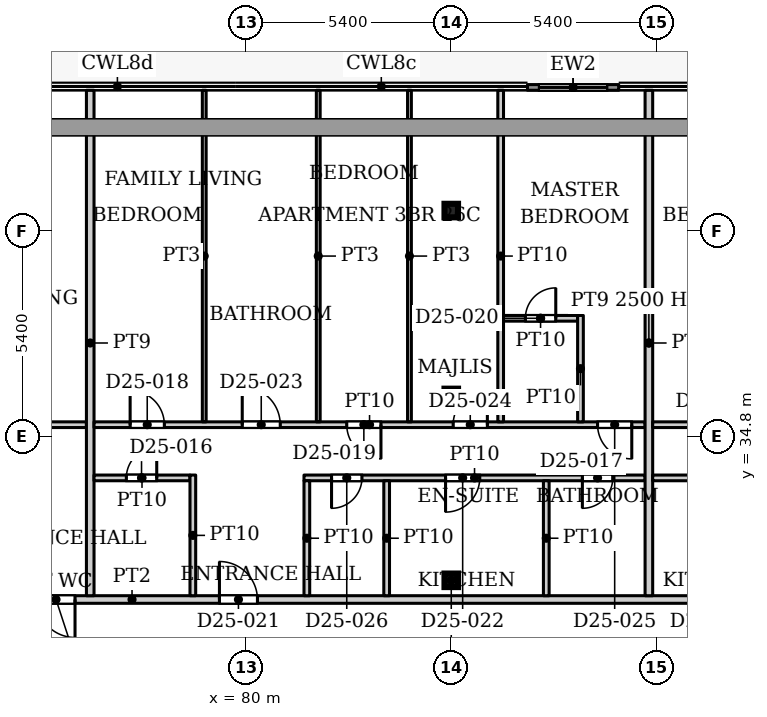
"""IFC4 building model, lengths in metres.
Left out: names, types, materials, properties, quantities, classifications, styles, units other than length and angle.
Written with IfcOpenShell. Run it as: python <this file> out.ifc"""

import sys

from ifc_helpers import new_model, si_unit, direction, frame, frame_2d, origin, origin_2d, place, context, subcontext, project, spatial, rectangle, hollow_rectangle, extrude, source, transform, mapped, element, fill, save


model = new_model("IFC4")
c1 = context("Model", 3, precision=1e-05, world=origin(), true_north=direction((0.0, 1.0)))
c2 = subcontext(c1, "Body", "Model", "MODEL_VIEW")
j1 = project(units=[si_unit("LENGTHUNIT", "METRE"), si_unit("PLANEANGLEUNIT", "RADIAN")], contexts=[c1])
p1 = place(None, origin())
s1 = spatial("IfcSite", under=j1, at=p1, CompositionType="ELEMENT")
p2 = place(p1, origin())
s2 = spatial("IfcBuilding", under=s1, at=p2, CompositionType="ELEMENT")
p3 = place(p2, frame((0.0, 0.0, 113.6)))
s3 = spatial("IfcBuildingStorey", under=s2, at=p3, CompositionType="ELEMENT", Elevation=113.6)
for number, where, z_axis, x_axis in (
    (1, (85.4, 31.005, 0.0), (0.0, 0.0, 1.0), (1.0, 0.0, 0.0)),
    (2, (85.4, 35.87, 0.0), (0.0, 0.0, 1.0), (1.0, 0.0, 0.0)),
    (3, (85.4, 40.735, 0.0), (0.0, 0.0, 1.0), (1.0, 0.0, 0.0)),
):
    element("IfcColumn", number, at=place(p3, frame(where, z_axis=z_axis, x_axis=x_axis)), inside=s3, PredefinedType="COLUMN", context=c2, shape_type="SweptSolid", body=[
        extrude(hollow_rectangle(XDim=0.356, YDim=0.356, WallThickness=0.016, InnerFilletRadius=0.016, OuterFilletRadius=0.032, at=origin_2d()), origin(), (0.0, 0.0, 1.0), 3.9),
    ])
p4 = place(p3, frame((87.406, 43.975, 0.0), z_axis=(0.0, 0.0, 1.0), x_axis=(1.0, 0.0, 0.0)))
e4 = element("IfcWall", 4, at=p4, inside=s3, PredefinedType="SOLIDWALL", context=c2, shape_type="SweptSolid", body=[
    extrude(rectangle(XDim=2.4, YDim=0.15, at=frame_2d((1.2, 0.0))), origin(), (0.0, 0.0, 1.0), 3.75),
])
p5 = place(p4, frame((0.3, 0.0, 0.0)))
e5 = element("IfcOpeningElement", 5, at=p5, cuts=e4, PredefinedType="OPENING", context=c2, shape_type="SweptSolid", body=[
    extrude(rectangle(XDim=1.8, YDim=2.4, at=frame_2d((0.9, 1.2))), frame((0.0, 0.085, 0.0), z_axis=(0.0, -1.0, 0.0), x_axis=(1.0, 0.0, 0.0)), (0.0, 0.0, 1.0), 0.17),
])
p6 = place(p3, frame((55.9, 30.5, 0.0), z_axis=(0.0, 0.0, 1.0), x_axis=(1.0, 0.0, 0.0)))
e6 = element("IfcWall", 6, at=p6, inside=s3, PredefinedType="PARTITIONING", context=c2, shape_type="SweptSolid", body=[
    extrude(rectangle(XDim=42.2, YDim=0.2, at=frame_2d((21.1, 0.0))), origin(), (0.0, 0.0, 1.0), 3.6),
])
p7 = place(p6, frame((9.75, 0.0, 0.0)))
e7 = element("IfcOpeningElement", 7, at=p7, cuts=e6, PredefinedType="OPENING", context=c2, shape_type="SweptSolid", body=[
    extrude(rectangle(XDim=1.0, YDim=2.1, at=frame_2d((0.5, 1.05))), frame((0.0, 0.11, 0.0), z_axis=(0.0, -1.0, 0.0), x_axis=(1.0, 0.0, 0.0)), (0.0, 0.0, 1.0), 0.22),
])
p8 = place(p6, frame((18.6, 0.0, 0.0)))
e8 = element("IfcOpeningElement", 8, at=p8, cuts=e6, PredefinedType="OPENING", context=c2, shape_type="SweptSolid", body=[
    extrude(rectangle(XDim=1.0, YDim=2.1, at=frame_2d((0.5, 1.05))), frame((0.0, 0.11, 0.0), z_axis=(0.0, -1.0, 0.0), x_axis=(1.0, 0.0, 0.0)), (0.0, 0.0, 1.0), 0.22),
])
p9 = place(p6, frame((23.4, 0.0, 0.0)))
e9 = element("IfcOpeningElement", 9, at=p9, cuts=e6, PredefinedType="OPENING", context=c2, shape_type="SweptSolid", body=[
    extrude(rectangle(XDim=1.0, YDim=2.1, at=frame_2d((0.5, 1.05))), frame((0.0, 0.11, 0.0), z_axis=(0.0, -1.0, 0.0), x_axis=(1.0, 0.0, 0.0)), (0.0, 0.0, 1.0), 0.22),
])
p10 = place(p6, frame((40.2, 0.0, 0.0)))
e10 = element("IfcOpeningElement", 10, at=p10, cuts=e6, PredefinedType="OPENING", context=c2, shape_type="SweptSolid", body=[
    extrude(rectangle(XDim=1.0, YDim=2.1, at=frame_2d((0.5, 1.05))), frame((0.0, 0.11, 0.0), z_axis=(0.0, -1.0, 0.0), x_axis=(1.0, 0.0, 0.0)), (0.0, 0.0, 1.0), 0.22),
])
p11 = place(p3, frame((67.3, 35.1, 0.0), z_axis=(0.0, 0.0, 1.0), x_axis=(1.0, 0.0, 0.0)))
e11 = element("IfcWall", 11, at=p11, inside=s3, PredefinedType="PARTITIONING", context=c2, shape_type="SweptSolid", body=[
    extrude(rectangle(XDim=8.5, YDim=0.15, at=frame_2d((4.25, 0.0))), origin(), (0.0, 0.0, 1.0), 3.6),
])
p12 = place(p11, frame((1.0, 0.0, 0.0)))
e12 = element("IfcOpeningElement", 12, at=p12, cuts=e11, PredefinedType="OPENING", context=c2, shape_type="SweptSolid", body=[
    extrude(rectangle(XDim=0.9, YDim=2.1, at=frame_2d((0.45, 1.05))), frame((0.0, 0.085, 0.0), z_axis=(0.0, -1.0, 0.0), x_axis=(1.0, 0.0, 0.0)), (0.0, 0.0, 1.0), 0.17),
])
p13 = place(p11, frame((5.7, 0.0, 0.0)))
e13 = element("IfcOpeningElement", 13, at=p13, cuts=e11, PredefinedType="OPENING", context=c2, shape_type="SweptSolid", body=[
    extrude(rectangle(XDim=1.0, YDim=2.1, at=frame_2d((0.5, 1.05))), frame((0.0, 0.085, 0.0), z_axis=(0.0, -1.0, 0.0), x_axis=(1.0, 0.0, 0.0)), (0.0, 0.0, 1.0), 0.17),
])
p14 = place(p3, frame((75.9, 30.6, 0.0), z_axis=(0.0, 0.0, 1.0), x_axis=(0.0, 1.0, 0.0)))
e14 = element("IfcWall", 14, at=p14, inside=s3, PredefinedType="PARTITIONING", context=c2, shape_type="SweptSolid", body=[
    extrude(rectangle(XDim=13.3, YDim=0.2, at=frame_2d((6.65, 0.0))), origin(), (0.0, 0.0, 1.0), 3.6),
])
p15 = place(p3, frame((76.0, 33.7, 0.0), z_axis=(0.0, 0.0, 1.0), x_axis=(1.0, 0.0, 0.0)))
e15 = element("IfcWall", 15, at=p15, inside=s3, PredefinedType="PARTITIONING", context=c2, shape_type="SweptSolid", body=[
    extrude(rectangle(XDim=2.525, YDim=0.15, at=frame_2d((1.262, 0.0))), origin(), (0.0, 0.0, 1.0), 3.6),
])
p16 = place(p15, frame((0.85, 0.0, 0.0)))
e16 = element("IfcOpeningElement", 16, at=p16, cuts=e15, PredefinedType="OPENING", context=c2, shape_type="SweptSolid", body=[
    extrude(rectangle(XDim=0.8, YDim=2.1, at=frame_2d((0.4, 1.05))), frame((0.0, 0.085, 0.0), z_axis=(0.0, -1.0, 0.0), x_axis=(1.0, 0.0, 0.0)), (0.0, 0.0, 1.0), 0.17),
])
p17 = place(p3, frame((76.0, 35.1, 0.0), z_axis=(0.0, 0.0, 1.0), x_axis=(1.0, 0.0, 0.0)))
e17 = element("IfcWall", 17, at=p17, inside=s3, PredefinedType="PARTITIONING", context=c2, shape_type="SweptSolid", body=[
    extrude(rectangle(XDim=14.5, YDim=0.15, at=frame_2d((7.25, 0.0))), origin(), (0.0, 0.0, 1.0), 3.6),
])
p18 = place(p17, frame((0.95, 0.0, 0.0)))
e18 = element("IfcOpeningElement", 18, at=p18, cuts=e17, PredefinedType="OPENING", context=c2, shape_type="SweptSolid", body=[
    extrude(rectangle(XDim=0.9, YDim=2.1, at=frame_2d((0.45, 1.05))), frame((0.0, 0.085, 0.0), z_axis=(0.0, -1.0, 0.0), x_axis=(1.0, 0.0, 0.0)), (0.0, 0.0, 1.0), 0.17),
])
p19 = place(p17, frame((6.65, 0.0, 0.0)))
e19 = element("IfcOpeningElement", 19, at=p19, cuts=e17, PredefinedType="OPENING", context=c2, shape_type="SweptSolid", body=[
    extrude(rectangle(XDim=0.9, YDim=2.1, at=frame_2d((0.45, 1.05))), frame((0.0, 0.085, 0.0), z_axis=(0.0, -1.0, 0.0), x_axis=(1.0, 0.0, 0.0)), (0.0, 0.0, 1.0), 0.17),
])
p20 = place(p17, frame((3.9, 0.0, 0.0)))
e20 = element("IfcOpeningElement", 20, at=p20, cuts=e17, PredefinedType="OPENING", context=c2, shape_type="SweptSolid", body=[
    extrude(rectangle(XDim=1.0, YDim=2.1, at=frame_2d((0.5, 1.05))), frame((0.0, 0.085, 0.0), z_axis=(0.0, -1.0, 0.0), x_axis=(1.0, 0.0, 0.0)), (0.0, 0.0, 1.0), 0.17),
])
p21 = place(p17, frame((9.45, 0.0, 0.0)))
e21 = element("IfcOpeningElement", 21, at=p21, cuts=e17, PredefinedType="OPENING", context=c2, shape_type="SweptSolid", body=[
    extrude(rectangle(XDim=0.9, YDim=2.1, at=frame_2d((0.45, 1.05))), frame((0.0, 0.085, 0.0), z_axis=(0.0, -1.0, 0.0), x_axis=(1.0, 0.0, 0.0)), (0.0, 0.0, 1.0), 0.17),
])
p22 = place(p17, frame((13.25, 0.0, 0.0)))
e22 = element("IfcOpeningElement", 22, at=p22, cuts=e17, PredefinedType="OPENING", context=c2, shape_type="SweptSolid", body=[
    extrude(rectangle(XDim=0.9, YDim=2.1, at=frame_2d((0.45, 1.05))), frame((0.0, 0.085, 0.0), z_axis=(0.0, -1.0, 0.0), x_axis=(1.0, 0.0, 0.0)), (0.0, 0.0, 1.0), 0.17),
])
p23 = place(p3, frame((78.6, 30.6, 0.0), z_axis=(0.0, 0.0, 1.0), x_axis=(0.0, 1.0, 0.0)))
e23 = element("IfcWall", 23, at=p23, inside=s3, PredefinedType="PARTITIONING", context=c2, shape_type="SweptSolid", body=[
    extrude(rectangle(XDim=3.175, YDim=0.15, at=frame_2d((1.587, 0.0))), origin(), (0.0, 0.0, 1.0), 3.6),
])
p24 = place(p3, frame((78.9, 35.175, 0.0), z_axis=(0.0, 0.0, 1.0), x_axis=(0.0, 1.0, 0.0)))
e24 = element("IfcWall", 24, at=p24, inside=s3, PredefinedType="PARTITIONING", context=c2, shape_type="SweptSolid", body=[
    extrude(rectangle(XDim=8.725, YDim=0.1, at=frame_2d((4.362, 0.0))), origin(), (0.0, 0.0, 1.0), 3.6),
])
p25 = place(p3, frame((81.525, 33.7, 0.0), z_axis=(0.0, 0.0, 1.0), x_axis=(1.0, 0.0, 0.0)))
e25 = element("IfcWall", 25, at=p25, inside=s3, PredefinedType="PARTITIONING", context=c2, shape_type="SweptSolid", body=[
    extrude(rectangle(XDim=8.975, YDim=0.15, at=frame_2d((4.488, 0.0))), origin(), (0.0, 0.0, 1.0), 3.6),
])
p26 = place(p25, frame((7.325, 0.0, 0.0)))
e26 = element("IfcOpeningElement", 26, at=p26, cuts=e25, PredefinedType="OPENING", context=c2, shape_type="SweptSolid", body=[
    extrude(rectangle(XDim=0.8, YDim=2.1, at=frame_2d((0.4, 1.05))), frame((0.0, 0.085, 0.0), z_axis=(0.0, -1.0, 0.0), x_axis=(1.0, 0.0, 0.0)), (0.0, 0.0, 1.0), 0.17),
])
p27 = place(p25, frame((3.725, 0.0, 0.0)))
e27 = element("IfcOpeningElement", 27, at=p27, cuts=e25, PredefinedType="OPENING", context=c2, shape_type="SweptSolid", body=[
    extrude(rectangle(XDim=0.9, YDim=2.1, at=frame_2d((0.45, 1.05))), frame((0.0, 0.085, 0.0), z_axis=(0.0, -1.0, 0.0), x_axis=(1.0, 0.0, 0.0)), (0.0, 0.0, 1.0), 0.17),
])
p28 = place(p25, frame((0.725, 0.0, 0.0)))
e28 = element("IfcOpeningElement", 28, at=p28, cuts=e25, PredefinedType="OPENING", context=c2, shape_type="SweptSolid", body=[
    extrude(rectangle(XDim=0.8, YDim=2.1, at=frame_2d((0.4, 1.05))), frame((0.0, 0.085, 0.0), z_axis=(0.0, -1.0, 0.0), x_axis=(1.0, 0.0, 0.0)), (0.0, 0.0, 1.0), 0.17),
])
p29 = place(p3, frame((81.6, 30.6, 0.0), z_axis=(0.0, 0.0, 1.0), x_axis=(0.0, 1.0, 0.0)))
e29 = element("IfcWall", 29, at=p29, inside=s3, PredefinedType="PARTITIONING", context=c2, shape_type="SweptSolid", body=[
    extrude(rectangle(XDim=3.025, YDim=0.15, at=frame_2d((1.512, 0.0))), origin(), (0.0, 0.0, 1.0), 3.6),
])
p30 = place(p3, frame((81.9, 35.175, 0.0), z_axis=(0.0, 0.0, 1.0), x_axis=(0.0, 1.0, 0.0)))
e30 = element("IfcWall", 30, at=p30, inside=s3, PredefinedType="PARTITIONING", context=c2, shape_type="SweptSolid", body=[
    extrude(rectangle(XDim=8.725, YDim=0.1, at=frame_2d((4.362, 0.0))), origin(), (0.0, 0.0, 1.0), 3.6),
])
p31 = place(p3, frame((83.7, 30.6, 0.0), z_axis=(0.0, 0.0, 1.0), x_axis=(0.0, 1.0, 0.0)))
e31 = element("IfcWall", 31, at=p31, inside=s3, PredefinedType="PARTITIONING", context=c2, shape_type="SweptSolid", body=[
    extrude(rectangle(XDim=3.025, YDim=0.15, at=frame_2d((1.512, 0.0))), origin(), (0.0, 0.0, 1.0), 3.6),
])
p32 = place(p3, frame((84.3, 35.175, 0.0), z_axis=(0.0, 0.0, 1.0), x_axis=(0.0, 1.0, 0.0)))
e32 = element("IfcWall", 32, at=p32, inside=s3, PredefinedType="PARTITIONING", context=c2, shape_type="SweptSolid", body=[
    extrude(rectangle(XDim=8.725, YDim=0.1, at=frame_2d((4.362, 0.0))), origin(), (0.0, 0.0, 1.0), 3.6),
])
p33 = place(p3, frame((86.7, 35.175, 0.0), z_axis=(0.0, 0.0, 1.0), x_axis=(0.0, 1.0, 0.0)))
e33 = element("IfcWall", 33, at=p33, inside=s3, PredefinedType="PARTITIONING", context=c2, shape_type="SweptSolid", body=[
    extrude(rectangle(XDim=8.725, YDim=0.15, at=frame_2d((4.362, 0.0))), origin(), (0.0, 0.0, 1.0), 3.6),
])
p34 = place(p3, frame((86.775, 37.9, 0.0), z_axis=(0.0, 0.0, 1.0), x_axis=(1.0, 0.0, 0.0)))
e34 = element("IfcWall", 34, at=p34, inside=s3, PredefinedType="PARTITIONING", context=c2, shape_type="SweptSolid", body=[
    extrude(rectangle(XDim=1.95, YDim=0.15, at=frame_2d((0.975, 0.0))), origin(), (0.0, 0.0, 1.0), 3.6),
])
p35 = place(p34, frame((0.575, 0.0, 0.0)))
e35 = element("IfcOpeningElement", 35, at=p35, cuts=e34, PredefinedType="OPENING", context=c2, shape_type="SweptSolid", body=[
    extrude(rectangle(XDim=0.8, YDim=2.1, at=frame_2d((0.4, 1.05))), frame((0.0, 0.085, 0.0), z_axis=(0.0, -1.0, 0.0), x_axis=(1.0, 0.0, 0.0)), (0.0, 0.0, 1.0), 0.17),
])
p36 = place(p3, frame((87.9, 30.6, 0.0), z_axis=(0.0, 0.0, 1.0), x_axis=(0.0, 1.0, 0.0)))
e36 = element("IfcWall", 36, at=p36, inside=s3, PredefinedType="PARTITIONING", context=c2, shape_type="SweptSolid", body=[
    extrude(rectangle(XDim=3.025, YDim=0.15, at=frame_2d((1.512, 0.0))), origin(), (0.0, 0.0, 1.0), 3.6),
])
p37 = place(p3, frame((88.8, 35.175, 0.0), z_axis=(0.0, 0.0, 1.0), x_axis=(0.0, 1.0, 0.0)))
e37 = element("IfcWall", 37, at=p37, inside=s3, PredefinedType="PARTITIONING", context=c2, shape_type="SweptSolid", body=[
    extrude(rectangle(XDim=2.8, YDim=0.15, at=frame_2d((1.4, 0.0))), origin(), (0.0, 0.0, 1.0), 3.6),
])
p38 = place(p3, frame((90.6, 30.6, 0.0), z_axis=(0.0, 0.0, 1.0), x_axis=(0.0, 1.0, 0.0)))
e38 = element("IfcWall", 38, at=p38, inside=s3, PredefinedType="PARTITIONING", context=c2, shape_type="SweptSolid", body=[
    extrude(rectangle(XDim=13.3, YDim=0.2, at=frame_2d((6.65, 0.0))), origin(), (0.0, 0.0, 1.0), 2.5),
])
p39 = place(p3, frame((90.7, 33.7, 0.0), z_axis=(0.0, 0.0, 1.0), x_axis=(1.0, 0.0, 0.0)))
e39 = element("IfcWall", 39, at=p39, inside=s3, PredefinedType="PARTITIONING", context=c2, shape_type="SweptSolid", body=[
    extrude(rectangle(XDim=5.075, YDim=0.15, at=frame_2d((2.538, 0.0))), origin(), (0.0, 0.0, 1.0), 3.6),
])
p40 = place(p39, frame((1.1, 0.0, 0.0)))
e40 = element("IfcOpeningElement", 40, at=p40, cuts=e39, PredefinedType="OPENING", context=c2, shape_type="SweptSolid", body=[
    extrude(rectangle(XDim=0.9, YDim=2.1, at=frame_2d((0.45, 1.05))), frame((0.0, 0.085, 0.0), z_axis=(0.0, -1.0, 0.0), x_axis=(1.0, 0.0, 0.0)), (0.0, 0.0, 1.0), 0.17),
])
p41 = place(p39, frame((3.7, 0.0, 0.0)))
e41 = element("IfcOpeningElement", 41, at=p41, cuts=e39, PredefinedType="OPENING", context=c2, shape_type="SweptSolid", body=[
    extrude(rectangle(XDim=0.8, YDim=2.1, at=frame_2d((0.4, 1.05))), frame((0.0, 0.085, 0.0), z_axis=(0.0, -1.0, 0.0), x_axis=(1.0, 0.0, 0.0)), (0.0, 0.0, 1.0), 0.17),
])
p42 = place(p3, frame((90.7, 35.1, 0.0), z_axis=(0.0, 0.0, 1.0), x_axis=(1.0, 0.0, 0.0)))
e42 = element("IfcWall", 42, at=p42, inside=s3, PredefinedType="PARTITIONING", context=c2, shape_type="SweptSolid", body=[
    extrude(rectangle(XDim=9.2, YDim=0.15, at=frame_2d((4.6, 0.0))), origin(), (0.0, 0.0, 1.0), 3.6),
])
p43 = place(p42, frame((1.25, 0.0, 0.0)))
e43 = element("IfcOpeningElement", 43, at=p43, cuts=e42, PredefinedType="OPENING", context=c2, shape_type="SweptSolid", body=[
    extrude(rectangle(XDim=0.9, YDim=2.1, at=frame_2d((0.45, 1.05))), frame((0.0, 0.085, 0.0), z_axis=(0.0, -1.0, 0.0), x_axis=(1.0, 0.0, 0.0)), (0.0, 0.0, 1.0), 0.17),
])
p44 = place(p42, frame((5.85, 0.0, 0.0)))
e44 = element("IfcOpeningElement", 44, at=p44, cuts=e42, PredefinedType="OPENING", context=c2, shape_type="SweptSolid", body=[
    extrude(rectangle(XDim=1.0, YDim=2.1, at=frame_2d((0.5, 1.05))), frame((0.0, 0.085, 0.0), z_axis=(0.0, -1.0, 0.0), x_axis=(1.0, 0.0, 0.0)), (0.0, 0.0, 1.0), 0.17),
])
m1 = source(origin(), c2, "Body", "SweptSolid", [
    extrude(rectangle(XDim=1.8, YDim=2.4, at=frame_2d((0.9, 1.2))), frame((0.0, 0.025, 0.0), z_axis=(0.0, -1.0, 0.0), x_axis=(1.0, 0.0, 0.0)), (0.0, 0.0, 1.0), 0.05),
])
p45 = place(p5, origin())
e45 = element("IfcDoor", 45, at=p45, inside=s3, OperationType="SLIDING_TO_LEFT", PredefinedType="DOOR", context=c2, shape_type="MappedRepresentation", body=[
    mapped(m1, transform((0.0, 0.0, 0.0), x_axis=(1.0, 0.0, 0.0), y_axis=(0.0, 1.0, 0.0), z_axis=(0.0, 0.0, 1.0), scale=1.0)),
])
fill(e5, e45)
m2 = source(origin(), c2, "Body", "SweptSolid", [
    extrude(rectangle(XDim=1.0, YDim=2.1, at=frame_2d((0.5, 1.05))), frame((0.0, 0.025, 0.0), z_axis=(0.0, -1.0, 0.0), x_axis=(1.0, 0.0, 0.0)), (0.0, 0.0, 1.0), 0.05),
])
p46 = place(p8, origin())
e46 = element("IfcDoor", 46, at=p46, inside=s3, OperationType="SINGLE_SWING_RIGHT", PredefinedType="DOOR", context=c2, shape_type="MappedRepresentation", body=[
    mapped(m2, transform((0.0, 0.0, 0.0), x_axis=(1.0, 0.0, 0.0), y_axis=(0.0, 1.0, 0.0), z_axis=(0.0, 0.0, 1.0), scale=1.0)),
])
fill(e8, e46)
m3 = source(origin(), c2, "Body", "SweptSolid", [
    extrude(rectangle(XDim=0.8, YDim=2.1, at=frame_2d((0.4, 1.05))), frame((0.0, 0.025, 0.0), z_axis=(0.0, -1.0, 0.0), x_axis=(1.0, 0.0, 0.0)), (0.0, 0.0, 1.0), 0.05),
])
p47 = place(p16, origin())
e47 = element("IfcDoor", 47, at=p47, inside=s3, OperationType="SINGLE_SWING_LEFT", PredefinedType="DOOR", context=c2, shape_type="MappedRepresentation", body=[
    mapped(m3, transform((0.0, 0.0, 0.0), x_axis=(1.0, 0.0, 0.0), y_axis=(0.0, 1.0, 0.0), z_axis=(0.0, 0.0, 1.0), scale=1.0)),
])
fill(e16, e47)
p48 = place(p26, origin())
e48 = element("IfcDoor", 48, at=p48, inside=s3, OperationType="SINGLE_SWING_RIGHT", PredefinedType="DOOR", context=c2, shape_type="MappedRepresentation", body=[
    mapped(m3, transform((0.0, 0.0, 0.0), x_axis=(1.0, 0.0, 0.0), y_axis=(0.0, 1.0, 0.0), z_axis=(0.0, 0.0, 1.0), scale=1.0)),
])
fill(e26, e48)
m4 = source(origin(), c2, "Body", "SweptSolid", [
    extrude(rectangle(XDim=0.9, YDim=2.1, at=frame_2d((0.45, 1.05))), frame((0.0, 0.025, 0.0), z_axis=(0.0, -1.0, 0.0), x_axis=(1.0, 0.0, 0.0)), (0.0, 0.0, 1.0), 0.05),
])
p49 = place(p18, origin())
e49 = element("IfcDoor", 49, at=p49, inside=s3, OperationType="SINGLE_SWING_LEFT", PredefinedType="DOOR", context=c2, shape_type="MappedRepresentation", body=[
    mapped(m4, transform((0.0, 0.0, 0.0), x_axis=(1.0, 0.0, 0.0), y_axis=(0.0, 1.0, 0.0), z_axis=(0.0, 0.0, 1.0), scale=1.0)),
])
fill(e18, e49)
p50 = place(p19, origin())
e50 = element("IfcDoor", 50, at=p50, inside=s3, OperationType="SINGLE_SWING_RIGHT", PredefinedType="DOOR", context=c2, shape_type="MappedRepresentation", body=[
    mapped(m4, transform((0.0, 0.0, 0.0), x_axis=(1.0, 0.0, 0.0), y_axis=(0.0, 1.0, 0.0), z_axis=(0.0, 0.0, 1.0), scale=1.0)),
])
fill(e19, e50)
p51 = place(p35, origin())
e51 = element("IfcDoor", 51, at=p51, inside=s3, OperationType="SINGLE_SWING_LEFT", PredefinedType="DOOR", context=c2, shape_type="MappedRepresentation", body=[
    mapped(m3, transform((0.0, 0.0, 0.0), x_axis=(1.0, 0.0, 0.0), y_axis=(0.0, 1.0, 0.0), z_axis=(0.0, 0.0, 1.0), scale=1.0)),
])
fill(e35, e51)
p52 = place(p9, origin())
e52 = element("IfcDoor", 52, at=p52, inside=s3, OperationType="SINGLE_SWING_LEFT", PredefinedType="DOOR", context=c2, shape_type="MappedRepresentation", body=[
    mapped(m2, transform((0.0, 0.0, 0.0), x_axis=(1.0, 0.0, 0.0), y_axis=(0.0, 1.0, 0.0), z_axis=(0.0, 0.0, 1.0), scale=1.0)),
])
fill(e9, e52)
p53 = place(p27, origin())
e53 = element("IfcDoor", 53, at=p53, inside=s3, OperationType="SINGLE_SWING_RIGHT", PredefinedType="DOOR", context=c2, shape_type="MappedRepresentation", body=[
    mapped(m4, transform((0.0, 0.0, 0.0), x_axis=(1.0, 0.0, 0.0), y_axis=(0.0, 1.0, 0.0), z_axis=(0.0, 0.0, 1.0), scale=1.0)),
])
fill(e27, e53)
m5 = source(origin(), c2, "Body", "SweptSolid", [
    extrude(rectangle(XDim=1.0, YDim=2.1, at=frame_2d((0.5, 1.05))), frame((0.0, 0.025, 0.0), z_axis=(0.0, -1.0, 0.0), x_axis=(1.0, 0.0, 0.0)), (0.0, 0.0, 1.0), 0.05),
])
p54 = place(p20, origin())
e54 = element("IfcDoor", 54, at=p54, inside=s3, OperationType="SINGLE_SWING_LEFT", PredefinedType="DOOR", context=c2, shape_type="MappedRepresentation", body=[
    mapped(m5, transform((0.0, 0.0, 0.0), x_axis=(1.0, 0.0, 0.0), y_axis=(0.0, 1.0, 0.0), z_axis=(0.0, 0.0, 1.0), scale=1.0)),
])
fill(e20, e54)
p55 = place(p21, origin())
e55 = element("IfcDoor", 55, at=p55, inside=s3, OperationType="SINGLE_SWING_LEFT", PredefinedType="DOOR", context=c2, shape_type="MappedRepresentation", body=[
    mapped(m4, transform((0.0, 0.0, 0.0), x_axis=(1.0, 0.0, 0.0), y_axis=(0.0, 1.0, 0.0), z_axis=(0.0, 0.0, 1.0), scale=1.0)),
])
fill(e21, e55)
p56 = place(p22, origin())
e56 = element("IfcDoor", 56, at=p56, inside=s3, OperationType="SINGLE_SWING_RIGHT", PredefinedType="DOOR", context=c2, shape_type="MappedRepresentation", body=[
    mapped(m4, transform((0.0, 0.0, 0.0), x_axis=(1.0, 0.0, 0.0), y_axis=(0.0, 1.0, 0.0), z_axis=(0.0, 0.0, 1.0), scale=1.0)),
])
fill(e22, e56)
p57 = place(p28, origin())
e57 = element("IfcDoor", 57, at=p57, inside=s3, OperationType="SINGLE_SWING_RIGHT", PredefinedType="DOOR", context=c2, shape_type="MappedRepresentation", body=[
    mapped(m3, transform((0.0, 0.0, 0.0), x_axis=(1.0, 0.0, 0.0), y_axis=(0.0, 1.0, 0.0), z_axis=(0.0, 0.0, 1.0), scale=1.0)),
])
fill(e28, e57)
save(model, sys.argv[1])
